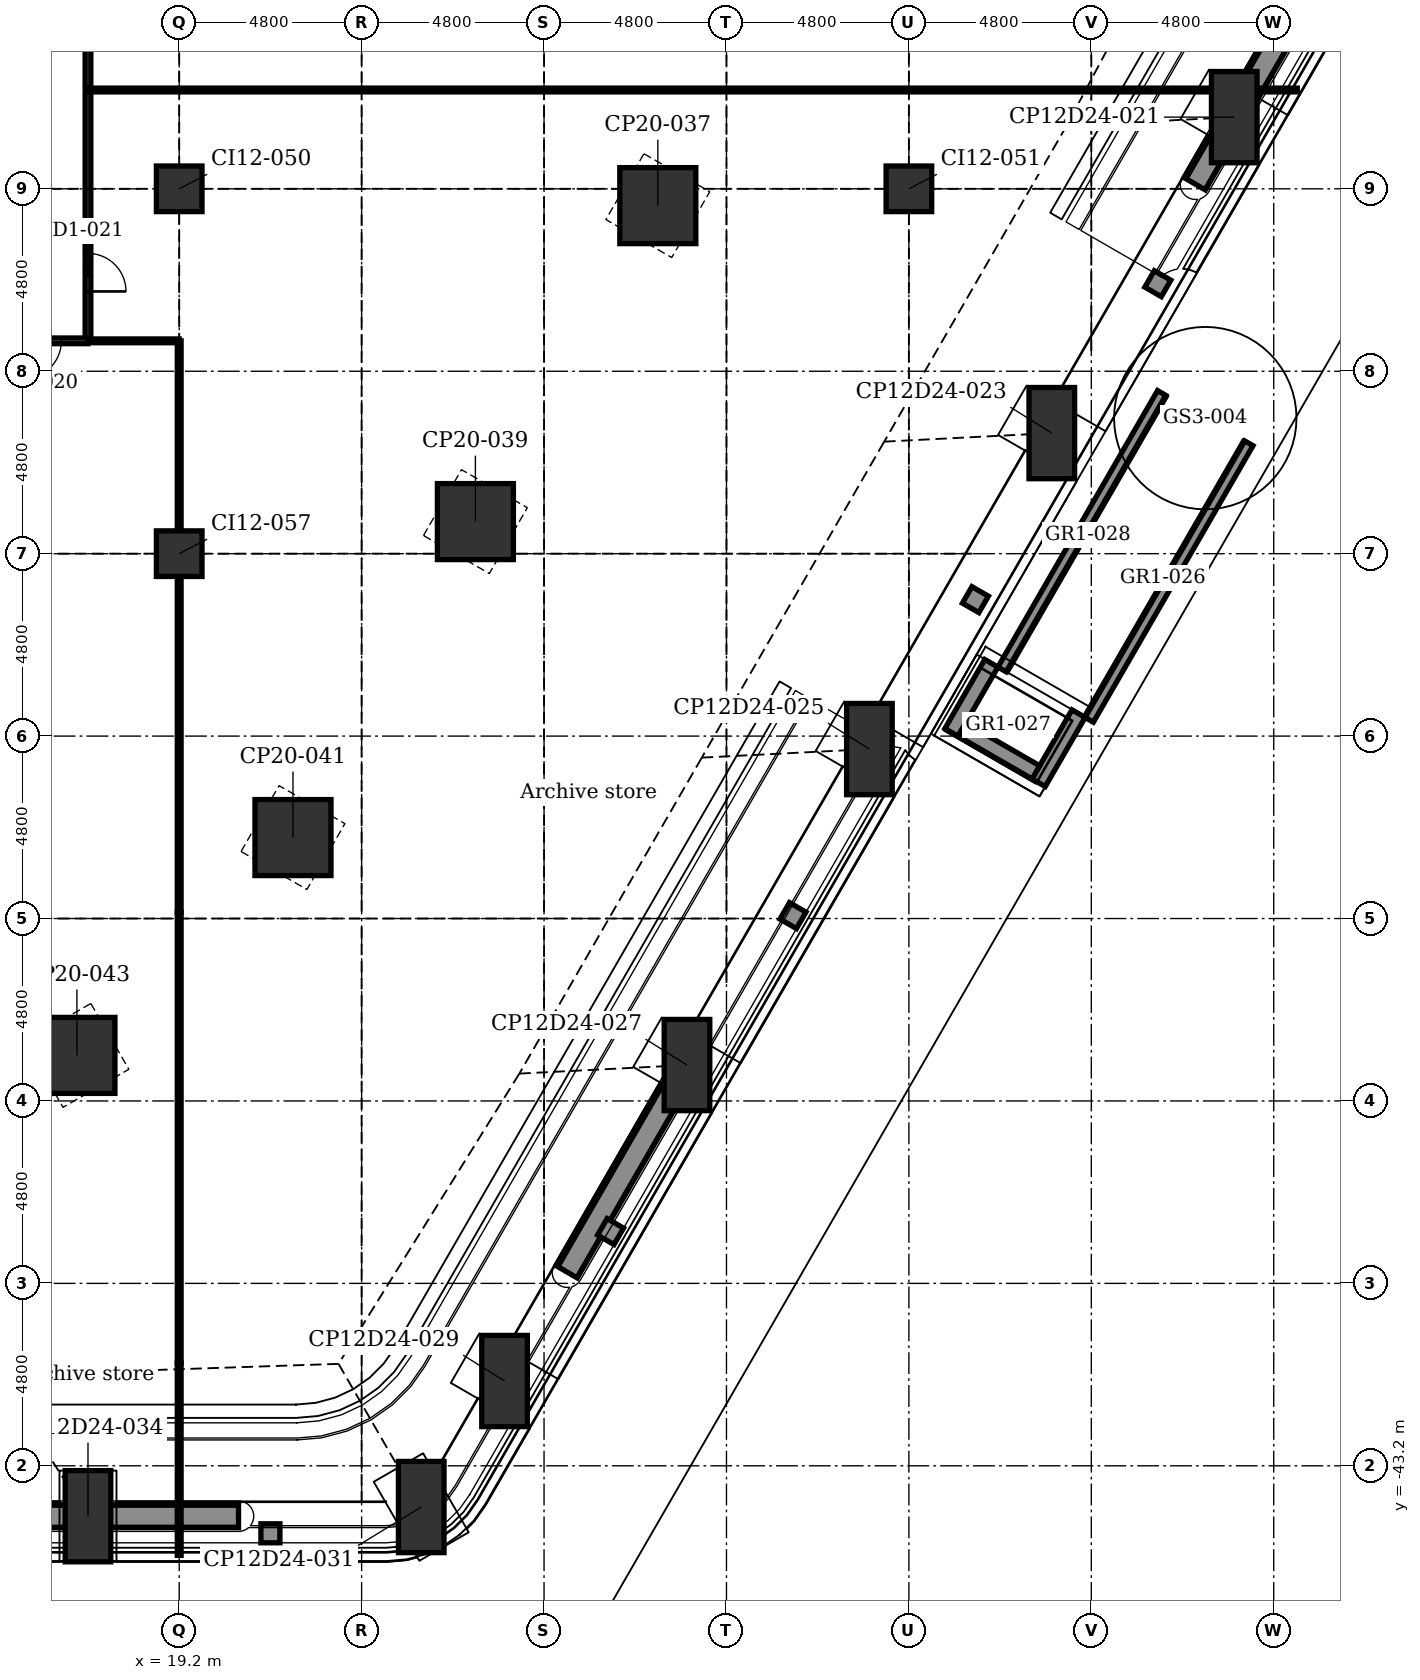
"""IFC4 building model, lengths in metres.
Left out: names, types, materials, properties, quantities, classifications, styles, units other than length and angle.
Written with IfcOpenShell. Run it as: python <this file> out.ifc"""

import sys

from ifc_helpers import new_model, si_unit, direction, frame, frame_2d, origin, origin_2d, place, context, subcontext, project, spatial, polyline, rectangle, outline, extrude, element, fill, save


model = new_model("IFC4")
c1 = context("Model", 3, precision=1e-05, world=origin(), true_north=direction((0.0, 1.0)))
c2 = subcontext(c1, "Body", "Model", "MODEL_VIEW")
j1 = project(units=[si_unit("LENGTHUNIT", "METRE"), si_unit("PLANEANGLEUNIT", "RADIAN")], contexts=[c1])
p1 = place(None, origin())
s1 = spatial("IfcSite", under=j1, at=p1, CompositionType="ELEMENT")
p2 = place(p1, origin())
s2 = spatial("IfcBuilding", under=s1, at=p2, CompositionType="ELEMENT")
p3 = place(p2, frame((0.0, 0.0, 7.0)))
s3 = spatial("IfcBuildingStorey", under=s2, at=p3, CompositionType="ELEMENT", Elevation=7.0)
for number, where, z_axis, x_axis in (
    (1, (46.961, -7.714, -0.3), (0.0, 0.0, 1.0), (0.5, 0.866, 0.0)),
    (2, (42.161, -16.028, -0.3), (0.0, 0.0, 1.0), (0.5, 0.866, 0.0)),
    (3, (37.361, -24.342, -0.3), (0.0, 0.0, 1.0), (0.5, 0.866, 0.0)),
    (4, (32.561, -32.655, -0.3), (0.0, 0.0, 1.0), (0.5, 0.866, 0.0)),
    (5, (27.761, -40.969, -0.3), (0.0, 0.0, 1.0), (0.5, 0.866, 0.0)),
    (6, (25.568, -44.285, -0.3), (0.0, 0.0, 1.0), (0.866, 0.5, 0.0)),
    (7, (16.8, -44.526, -0.3), (0.0, 0.0, 1.0), (1.0, 0.0, 0.0)),
):
    element("IfcColumn", number, at=place(p3, frame(where, z_axis=z_axis, x_axis=x_axis)), inside=s3, PredefinedType="COLUMN", context=c2, shape_type="SweptSolid", body=[
        extrude(rectangle(XDim=1.2, YDim=2.4, at=origin_2d()), origin(), (0.0, 0.0, 1.0), 5.4),
    ])
for number, where, z_axis, x_axis in (
    (8, (31.794, -10.042, -0.3), (0.0, 0.0, 1.0), (0.5, 0.866, 0.0)),
    (9, (26.994, -18.356, -0.3), (0.0, 0.0, 1.0), (0.5, 0.866, 0.0)),
    (10, (22.194, -26.67, -0.3), (0.0, 0.0, 1.0), (0.5, 0.866, 0.0)),
    (11, (16.509, -32.401, -0.3), (0.0, 0.0, 1.0), (0.866, 0.5, 0.0)),
):
    element("IfcColumn", number, at=place(p3, frame(where, z_axis=z_axis, x_axis=x_axis)), inside=s3, PredefinedType="COLUMN", context=c2, shape_type="SweptSolid", body=[
        extrude(rectangle(XDim=2.0, YDim=2.0, at=origin_2d()), origin(), (0.0, 0.0, 1.0), 5.4),
    ])
for number, where, z_axis, x_axis in (
    (12, (19.2, -19.2, -0.3), (0.0, 0.0, 1.0), (1.0, 0.0, 0.0)),
    (13, (19.2, -9.6, -0.3), (0.0, 0.0, 1.0), (1.0, 0.0, 0.0)),
    (14, (38.4, -9.6, -0.3), (0.0, 0.0, 1.0), (1.0, 0.0, 0.0)),
):
    element("IfcColumn", number, at=place(p3, frame(where, z_axis=z_axis, x_axis=x_axis)), inside=s3, PredefinedType="COLUMN", context=c2, shape_type="SweptSolid", body=[
        extrude(rectangle(XDim=1.2, YDim=1.2, at=origin_2d()), origin(), (0.0, 0.0, 1.0), 5.4),
    ])
for number, where, z_axis, x_axis in (
    (15, (32.414, -32.91, 5.4), (0.0, 0.0, 1.0), (-0.5, -0.866, 0.0)),
    (16, (48.941, -4.284, 5.4), (0.0, 0.0, 1.0), (-0.5, -0.866, 0.0)),
    (17, (20.761, -44.526, 5.4), (0.0, 0.0, 1.0), (-1.0, 0.0, 0.0)),
):
    element("IfcWall", number, at=place(p3, frame(where, z_axis=z_axis, x_axis=x_axis)), inside=s3, PredefinedType="USERDEFINED", context=c2, shape_type="SweptSolid", body=[
        extrude(rectangle(XDim=6.0, YDim=0.6, at=frame_2d((3.0, 0.0))), origin(), (0.0, 0.0, 1.0), 0.7),
    ])
p4 = place(p3, frame((47.346, -16.296, 0.0), z_axis=(0.0, 0.0, 1.0), x_axis=(-0.499993330357, -0.86602925447, 0.0)))
e18 = element("IfcWall", 18, at=p4, inside=s3, PredefinedType="SOLIDWALL", context=c2, shape_type="SweptSolid", body=[
    extrude(outline(polyline([(0.0, 0.0), (8.4, 0.0), (8.4, 5.5), (0.0, 0.274), (0.0, 0.0)])), frame((0.0, 0.125, 0.0), z_axis=(0.0, -1.0, 0.0), x_axis=(1.0, 0.0, 0.0)), (0.0, 0.0, 1.0), 0.25),
])
p5 = place(p3, frame((45.051, -14.971, 0.0), z_axis=(0.0, 0.0, 1.0), x_axis=(-0.500015128309, -0.866016669275, 0.0)))
e19 = element("IfcWall", 19, at=p5, inside=s3, PredefinedType="SOLIDWALL", context=c2, shape_type="SweptSolid", body=[
    extrude(outline(polyline([(0.0, 0.0), (8.4, 0.0), (8.4, 5.5), (0.0, 0.274), (0.0, 0.0)])), frame((0.0, 0.125, 0.0), z_axis=(0.0, -1.0, 0.0), x_axis=(1.0, 0.0, 0.0)), (0.0, 0.0, 1.0), 0.25),
])
for number, where, z_axis, x_axis in (
    (20, (42.865, -23.408, 0.45), (0.0, 0.0, 1.0), (-0.5, -0.866, 0.0)),
    (21, (40.57, -22.083, 0.45), (0.0, 0.0, 1.0), (-0.5, -0.866, 0.0)),
):
    element("IfcWall", number, at=place(p3, frame(where, z_axis=z_axis, x_axis=x_axis)), inside=s3, PredefinedType="SOLIDWALL", context=c2, shape_type="SweptSolid", body=[
        extrude(rectangle(XDim=2.1, YDim=0.4, at=frame_2d((1.05, 0.0))), origin(), (0.0, 0.0, 1.0), 4.75),
    ])
p6 = place(p3, frame((39.793, -23.829, 0.45), z_axis=(0.0, 0.0, 1.0), x_axis=(0.866017533419, -0.500013631625, 0.0)))
e22 = element("IfcWall", 22, at=p6, inside=s3, PredefinedType="SOLIDWALL", context=c2, shape_type="SweptSolid", body=[
    extrude(rectangle(XDim=2.25, YDim=0.4, at=frame_2d((1.125, 0.0))), origin(), (0.0, 0.0, 1.0), 4.75),
])
p7 = place(p3, frame((45.075, -11.879, 0.0), z_axis=(0.0, 0.0, 1.0), x_axis=(-0.499919672301, -0.866071776036, 0.0)))
e23 = element("IfcWall", 23, at=p7, inside=s3, PredefinedType="SOLIDWALL", context=c2, shape_type="SweptSolid", body=[
    extrude(rectangle(XDim=0.5, YDim=0.5, at=frame_2d((0.25, 0.0))), origin(), (0.0, 0.0, 1.0), 4.8),
])
for number, where, z_axis, x_axis in (
    (24, (40.275, -20.194, 0.0), (0.0, 0.0, 1.0), (-0.5, -0.866, 0.0)),
    (25, (35.475, -28.507, 0.0), (0.0, 0.0, 1.0), (-0.5, -0.866, 0.0)),
    (26, (30.675, -36.821, 0.0), (0.0, 0.0, 1.0), (-0.5, -0.866, 0.0)),
):
    element("IfcWall", number, at=place(p3, frame(where, z_axis=z_axis, x_axis=x_axis)), inside=s3, PredefinedType="SOLIDWALL", context=c2, shape_type="SweptSolid", body=[
        extrude(rectangle(XDim=0.5, YDim=0.5, at=frame_2d((0.25, 0.0))), origin(), (0.0, 0.0, 1.0), 4.8),
    ])
p8 = place(p3, frame((21.85, -44.976, 0.0), z_axis=(0.0, 0.0, 1.0), x_axis=(-1.0, 0.0, 0.0)))
e27 = element("IfcWall", 27, at=p8, inside=s3, PredefinedType="SOLIDWALL", context=c2, shape_type="SweptSolid", body=[
    extrude(rectangle(XDim=0.5, YDim=0.5, at=frame_2d((0.25, 0.0))), origin(), (0.0, 0.0, 1.0), 4.8),
])
p9 = place(p3, frame((19.2, -40.498, 0.0), z_axis=(0.0, 0.0, 1.0), x_axis=(0.0, 1.0, 0.0)))
e28 = element("IfcWall", 28, at=p9, inside=s3, PredefinedType="PARTITIONING", context=c2, shape_type="SweptSolid", body=[
    extrude(rectangle(XDim=11.858, YDim=0.1, at=frame_2d((5.929, 0.0))), origin(), (0.0, 0.0, 1.0), 4.567),
])
p10 = place(p3, frame((19.2, -45.556, 0.0), z_axis=(0.0, 0.0, 1.0), x_axis=(0.0, 1.0, 0.0)))
e29 = element("IfcWall", 29, at=p10, inside=s3, PredefinedType="PARTITIONING", context=c2, shape_type="SweptSolid", body=[
    extrude(rectangle(XDim=5.058, YDim=0.1, at=frame_2d((2.529, 0.0))), origin(), (0.0, 0.0, 1.0), 5.1),
])
p11 = place(p3, frame((19.2, -28.64, 0.0), z_axis=(0.0, 0.0, 1.0), x_axis=(0.0, 1.0, 0.0)))
e30 = element("IfcWall", 30, at=p11, inside=s3, PredefinedType="PARTITIONING", context=c2, shape_type="SweptSolid", body=[
    extrude(rectangle(XDim=8.88, YDim=0.1, at=frame_2d((4.44, 0.0))), origin(), (0.0, 0.0, 1.0), 4.693),
])
p12 = place(p3, frame((19.2, -19.76, 0.0), z_axis=(0.0, 0.0, 1.0), x_axis=(0.0, 1.0, 0.0)))
e31 = element("IfcWall", 31, at=p12, inside=s3, PredefinedType="PARTITIONING", context=c2, shape_type="SweptSolid", body=[
    extrude(rectangle(XDim=1.12, YDim=0.1, at=frame_2d((0.56, 0.0))), origin(), (0.0, 0.0, 1.0), 5.1),
])
p13 = place(p3, frame((19.2, -18.64, 0.0), z_axis=(0.0, 0.0, 1.0), x_axis=(0.0, 1.0, 0.0)))
e32 = element("IfcWall", 32, at=p13, inside=s3, PredefinedType="PARTITIONING", context=c2, shape_type="SweptSolid", body=[
    extrude(rectangle(XDim=5.04, YDim=0.1, at=frame_2d((2.52, 0.0))), origin(), (0.0, 0.0, 1.0), 4.693),
])
p14 = place(p3, frame((16.8, -13.6, 0.0), z_axis=(0.0, 0.0, 1.0), x_axis=(0.0, 1.0, 0.0)))
e33 = element("IfcWall", 33, at=p14, inside=s3, PredefinedType="PARTITIONING", context=c2, shape_type="SweptSolid", body=[
    extrude(rectangle(XDim=9.65, YDim=0.15, at=frame_2d((4.825, 0.0))), origin(), (0.0, 0.0, 1.0), 5.1),
])
p15 = place(p14, frame((1.3, 0.0, 0.0)))
e34 = element("IfcOpeningElement", 34, at=p15, cuts=e33, PredefinedType="OPENING", context=c2, shape_type="SweptSolid", body=[
    extrude(rectangle(XDim=1.0, YDim=2.1, at=frame_2d((0.5, 1.05))), frame((0.0, 0.085, 0.0), z_axis=(0.0, -1.0, 0.0), x_axis=(1.0, 0.0, 0.0)), (0.0, 0.0, 1.0), 0.17),
])
p16 = place(p14, frame((7.7, 0.0, 0.0)))
e35 = element("IfcOpeningElement", 35, at=p16, cuts=e33, PredefinedType="OPENING", context=c2, shape_type="SweptSolid", body=[
    extrude(rectangle(XDim=1.0, YDim=2.1, at=frame_2d((0.5, 1.05))), frame((0.0, 0.085, 0.0), z_axis=(0.0, -1.0, 0.0), x_axis=(1.0, 0.0, 0.0)), (0.0, 0.0, 1.0), 0.17),
])
p17 = place(p3, frame((16.8, -13.6, 0.0), z_axis=(0.0, 0.0, 1.0), x_axis=(1.0, 0.0, 0.0)))
e36 = element("IfcWall", 36, at=p17, inside=s3, PredefinedType="PARTITIONING", context=c2, shape_type="SweptSolid", body=[
    extrude(rectangle(XDim=2.4, YDim=0.1, at=frame_2d((1.2, 0.0))), origin(), (0.0, 0.0, 1.0), 5.1),
])
p18 = place(p3, frame((-16.8, -13.6, 0.0), z_axis=(0.0, 0.0, 1.0), x_axis=(1.0, 0.0, 0.0)))
e37 = element("IfcWall", 37, at=p18, inside=s3, PredefinedType="PARTITIONING", context=c2, shape_type="SweptSolid", body=[
    extrude(rectangle(XDim=33.6, YDim=0.15, at=frame_2d((16.8, 0.0))), origin(), (0.0, 0.0, 1.0), 5.1),
])
p19 = place(p18, frame((0.7, 0.0, 0.0)))
e38 = element("IfcOpeningElement", 38, at=p19, cuts=e37, PredefinedType="OPENING", context=c2, shape_type="SweptSolid", body=[
    extrude(rectangle(XDim=1.0, YDim=2.1, at=frame_2d((0.5, 1.05))), frame((0.0, 0.085, 0.0), z_axis=(0.0, -1.0, 0.0), x_axis=(1.0, 0.0, 0.0)), (0.0, 0.0, 1.0), 0.17),
])
p20 = place(p18, frame((4.3, 0.0, 0.0)))
e39 = element("IfcOpeningElement", 39, at=p20, cuts=e37, PredefinedType="OPENING", context=c2, shape_type="SweptSolid", body=[
    extrude(rectangle(XDim=1.0, YDim=2.1, at=frame_2d((0.5, 1.05))), frame((0.0, 0.085, 0.0), z_axis=(0.0, -1.0, 0.0), x_axis=(1.0, 0.0, 0.0)), (0.0, 0.0, 1.0), 0.17),
])
p21 = place(p18, frame((13.9, 0.0, 0.0)))
e40 = element("IfcOpeningElement", 40, at=p21, cuts=e37, PredefinedType="OPENING", context=c2, shape_type="SweptSolid", body=[
    extrude(rectangle(XDim=1.0, YDim=2.1, at=frame_2d((0.5, 1.05))), frame((0.0, 0.085, 0.0), z_axis=(0.0, -1.0, 0.0), x_axis=(1.0, 0.0, 0.0)), (0.0, 0.0, 1.0), 0.17),
])
p22 = place(p18, frame((23.5, 0.0, 0.0)))
e41 = element("IfcOpeningElement", 41, at=p22, cuts=e37, PredefinedType="OPENING", context=c2, shape_type="SweptSolid", body=[
    extrude(rectangle(XDim=1.0, YDim=2.1, at=frame_2d((0.5, 1.05))), frame((0.0, 0.085, 0.0), z_axis=(0.0, -1.0, 0.0), x_axis=(1.0, 0.0, 0.0)), (0.0, 0.0, 1.0), 0.17),
])
p23 = place(p18, frame((28.425, 0.0, 0.0)))
e42 = element("IfcOpeningElement", 42, at=p23, cuts=e37, PredefinedType="OPENING", context=c2, shape_type="SweptSolid", body=[
    extrude(rectangle(XDim=1.8, YDim=2.1, at=frame_2d((0.9, 1.05))), frame((0.0, 0.085, 0.0), z_axis=(0.0, -1.0, 0.0), x_axis=(1.0, 0.0, 0.0)), (0.0, 0.0, 1.0), 0.17),
])
p24 = place(p18, frame((31.9, 0.0, 0.0)))
e43 = element("IfcOpeningElement", 43, at=p24, cuts=e37, PredefinedType="OPENING", context=c2, shape_type="SweptSolid", body=[
    extrude(rectangle(XDim=1.0, YDim=2.1, at=frame_2d((0.5, 1.05))), frame((0.0, 0.085, 0.0), z_axis=(0.0, -1.0, 0.0), x_axis=(1.0, 0.0, 0.0)), (0.0, 0.0, 1.0), 0.17),
])
p25 = place(p3, frame((16.8, -7.0, 0.0), z_axis=(0.0, 0.0, 1.0), x_axis=(1.0, 0.0, 0.0)))
e44 = element("IfcWall", 44, at=p25, inside=s3, PredefinedType="PARTITIONING", context=c2, shape_type="SweptSolid", body=[
    extrude(rectangle(XDim=31.82, YDim=0.1, at=frame_2d((15.91, 0.0))), origin(), (0.0, 0.0, 1.0), 5.1),
])
p26 = place(p24, frame((1.0, 0.0, 0.0), z_axis=(0.0, 0.0, 1.0), x_axis=(-1.0, 0.0, 0.0)))
e45 = element("IfcDoor", 45, at=p26, inside=s3, OperationType="SINGLE_SWING_LEFT", PredefinedType="DOOR", context=c2, shape_type="SweptSolid", body=[
    extrude(rectangle(XDim=1.0, YDim=2.1, at=frame_2d((0.5, 1.05))), frame((0.0, 0.025, 0.0), z_axis=(0.0, -1.0, 0.0), x_axis=(1.0, 0.0, 0.0)), (0.0, 0.0, 1.0), 0.05),
])
fill(e43, e45)
p27 = place(p15, frame((1.0, 0.0, 0.0), z_axis=(0.0, 0.0, 1.0), x_axis=(-1.0, 0.0, 0.0)))
e46 = element("IfcDoor", 46, at=p27, inside=s3, OperationType="SINGLE_SWING_LEFT", PredefinedType="DOOR", context=c2, shape_type="SweptSolid", body=[
    extrude(rectangle(XDim=1.0, YDim=2.1, at=frame_2d((0.5, 1.05))), frame((0.0, 0.025, 0.0), z_axis=(0.0, -1.0, 0.0), x_axis=(1.0, 0.0, 0.0)), (0.0, 0.0, 1.0), 0.05),
])
fill(e34, e46)
save(model, sys.argv[1])
